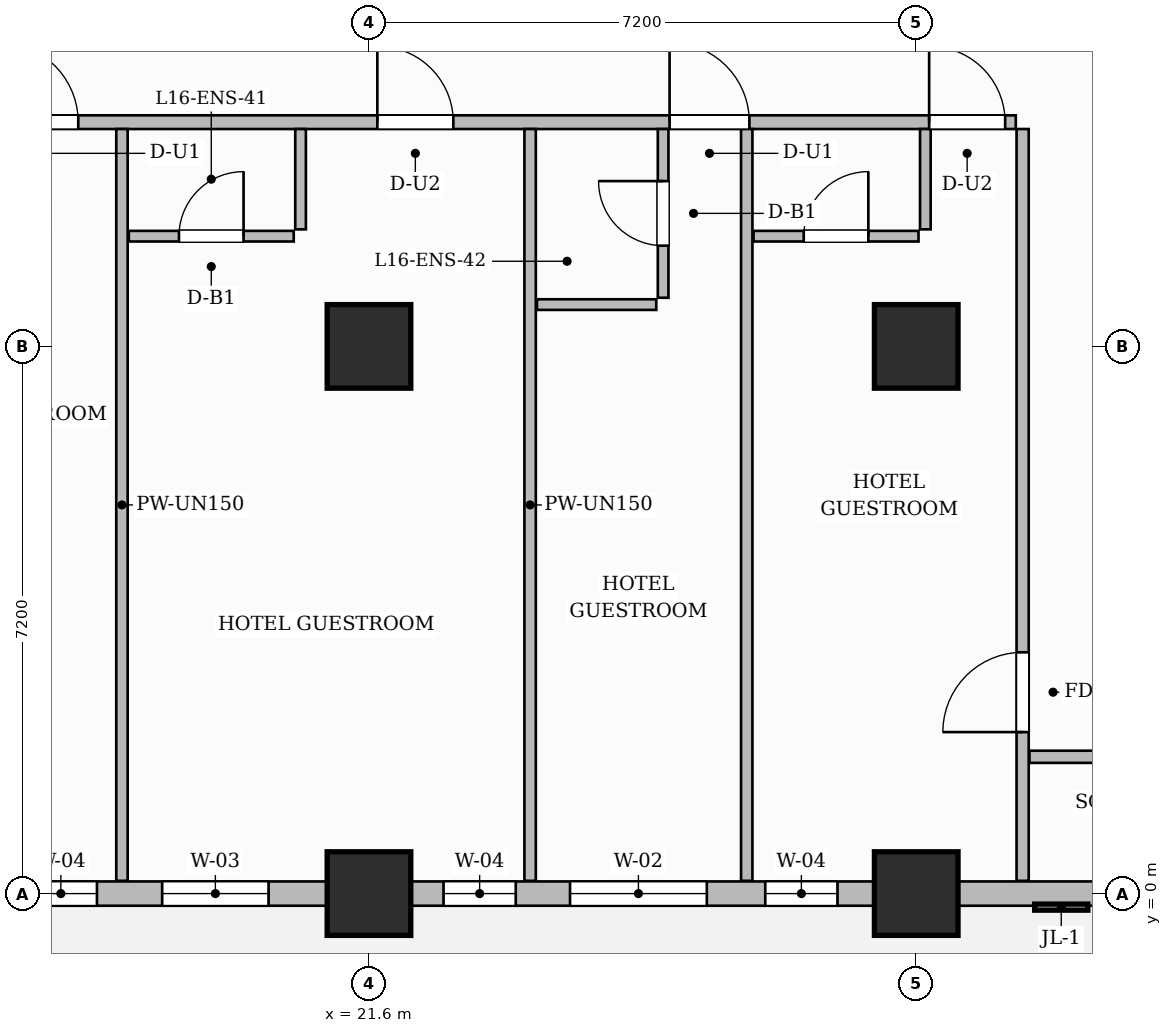
"""IFC4 building model, lengths in metres.
Left out: names, types, materials, properties, quantities, classifications, styles, units other than length and angle.
Written with IfcOpenShell. Run it as: python <this file> out.ifc"""

import sys

from ifc_helpers import new_model, si_unit, direction, frame, frame_2d, origin, origin_2d, place, context, subcontext, project, spatial, rectangle, extrude, source, transform, mapped, element, fill, save


model = new_model("IFC4")
c1 = context("Model", 3, precision=1e-05, world=origin(), true_north=direction((0.0, 1.0)))
c2 = subcontext(c1, "Body", "Model", "MODEL_VIEW")
j1 = project(units=[si_unit("LENGTHUNIT", "METRE"), si_unit("PLANEANGLEUNIT", "RADIAN")], contexts=[c1])
p1 = place(None, origin())
s1 = spatial("IfcSite", under=j1, at=p1, CompositionType="ELEMENT")
p2 = place(p1, origin())
s2 = spatial("IfcBuilding", under=s1, at=p2, CompositionType="ELEMENT")
p3 = place(p2, frame((0.0, 0.0, 69.4)))
s3 = spatial("IfcBuildingStorey", under=s2, at=p3, CompositionType="ELEMENT", Elevation=69.4)
m1 = source(origin(), c2, "Body", "SweptSolid", [
    extrude(rectangle(XDim=1.1, YDim=1.1, at=origin_2d()), origin(), (0.0, 0.0, 1.0), 3.7),
])
for number, where, z_axis, x_axis in (
    (1, (21.6, 0.0, 0.0), (0.0, 0.0, 1.0), (1.0, 0.0, 0.0)),
    (2, (21.6, 7.2, 0.0), (0.0, 0.0, 1.0), (1.0, 0.0, 0.0)),
    (3, (28.8, 0.0, 0.0), (0.0, 0.0, 1.0), (1.0, 0.0, 0.0)),
    (4, (28.8, 7.2, 0.0), (0.0, 0.0, 1.0), (1.0, 0.0, 0.0)),
):
    element("IfcColumn", number, at=place(p3, frame(where, z_axis=z_axis, x_axis=x_axis)), inside=s3, PredefinedType="COLUMN", context=c2, shape_type="MappedRepresentation", body=[
        mapped(m1, transform((0.0, 0.0, 0.0), scale=1.0)),
    ])
p4 = place(p3, frame((14.568, 10.15, 0.0), z_axis=(0.0, 0.0, 1.0), x_axis=(1.0, 0.0, 0.0)))
e5 = element("IfcWall", 5, at=p4, inside=s3, PredefinedType="PARTITIONING", context=c2, shape_type="SweptSolid", body=[
    extrude(rectangle(XDim=15.542, YDim=0.18, at=frame_2d((7.771, 0.0))), origin(), (0.0, 0.0, 1.0), 3.45),
])
p5 = place(p4, frame((2.157, 0.0, 0.0)))
e6 = element("IfcOpeningElement", 6, at=p5, cuts=e5, PredefinedType="OPENING", context=c2, shape_type="SweptSolid", body=[
    extrude(rectangle(XDim=1.05, YDim=2.25, at=frame_2d((0.525, 1.125))), frame((0.0, 0.1, 0.0), z_axis=(0.0, -1.0, 0.0), x_axis=(1.0, 0.0, 0.0)), (0.0, 0.0, 1.0), 0.2),
])
p6 = place(p4, frame((7.142, 0.0, 0.0)))
e7 = element("IfcOpeningElement", 7, at=p6, cuts=e5, PredefinedType="OPENING", context=c2, shape_type="SweptSolid", body=[
    extrude(rectangle(XDim=1.0, YDim=2.2, at=frame_2d((0.5, 1.1))), frame((0.0, 0.1, 0.0), z_axis=(0.0, -1.0, 0.0), x_axis=(1.0, 0.0, 0.0)), (0.0, 0.0, 1.0), 0.2),
])
p7 = place(p4, frame((10.987, 0.0, 0.0)))
e8 = element("IfcOpeningElement", 8, at=p7, cuts=e5, PredefinedType="OPENING", context=c2, shape_type="SweptSolid", body=[
    extrude(rectangle(XDim=1.05, YDim=2.25, at=frame_2d((0.525, 1.125))), frame((0.0, 0.1, 0.0), z_axis=(0.0, -1.0, 0.0), x_axis=(1.0, 0.0, 0.0)), (0.0, 0.0, 1.0), 0.2),
])
p8 = place(p4, frame((14.402, 0.0, 0.0)))
e9 = element("IfcOpeningElement", 9, at=p8, cuts=e5, PredefinedType="OPENING", context=c2, shape_type="SweptSolid", body=[
    extrude(rectangle(XDim=1.0, YDim=2.2, at=frame_2d((0.5, 1.1))), frame((0.0, 0.1, 0.0), z_axis=(0.0, -1.0, 0.0), x_axis=(1.0, 0.0, 0.0)), (0.0, 0.0, 1.0), 0.2),
])
p9 = place(p3, frame((30.2, 0.168, 0.0), z_axis=(0.0, 0.0, 1.0), x_axis=(0.0, 1.0, 0.0)))
e10 = element("IfcWall", 10, at=p9, inside=s3, PredefinedType="PARTITIONING", context=c2, shape_type="SweptSolid", body=[
    extrude(rectangle(XDim=9.892, YDim=0.16, at=frame_2d((4.946, 0.0))), origin(), (0.0, 0.0, 1.0), 3.45),
])
p10 = place(p9, frame((1.957, 0.0, 0.0)))
e11 = element("IfcOpeningElement", 11, at=p10, cuts=e10, PredefinedType="OPENING", context=c2, shape_type="SweptSolid", body=[
    extrude(rectangle(XDim=1.05, YDim=2.15, at=frame_2d((0.525, 1.075))), frame((0.0, 0.09, 0.0), z_axis=(0.0, -1.0, 0.0), x_axis=(1.0, 0.0, 0.0)), (0.0, 0.0, 1.0), 0.18),
])
p11 = place(p3, frame((30.29, 1.8, 0.0), z_axis=(0.0, 0.0, 1.0), x_axis=(1.0, 0.0, 0.0)))
e12 = element("IfcWall", 12, at=p11, inside=s3, PredefinedType="PARTITIONING", context=c2, shape_type="SweptSolid", body=[
    extrude(rectangle(XDim=19.37, YDim=0.16, at=frame_2d((9.685, 0.0))), origin(), (0.0, 0.0, 1.0), 3.45),
])
p12 = place(p11, frame((5.213, 0.0, 0.0)))
e13 = element("IfcOpeningElement", 13, at=p12, cuts=e12, PredefinedType="OPENING", context=c2, shape_type="SweptSolid", body=[
    extrude(rectangle(XDim=0.9, YDim=2.15, at=frame_2d((0.45, 1.075))), frame((0.0, 0.09, 0.0), z_axis=(0.0, -1.0, 0.0), x_axis=(1.0, 0.0, 0.0)), (0.0, 0.0, 1.0), 0.18),
])
p13 = place(p11, frame((14.06, 0.0, 0.0)))
e14 = element("IfcOpeningElement", 14, at=p13, cuts=e12, PredefinedType="OPENING", context=c2, shape_type="SweptSolid", body=[
    extrude(rectangle(XDim=0.9, YDim=2.15, at=frame_2d((0.45, 1.075))), frame((0.0, 0.09, 0.0), z_axis=(0.0, -1.0, 0.0), x_axis=(1.0, 0.0, 0.0)), (0.0, 0.0, 1.0), 0.18),
])
p14 = place(p3, frame((18.35, 0.168, 0.0), z_axis=(0.0, 0.0, 1.0), x_axis=(0.0, 1.0, 0.0)))
e15 = element("IfcWall", 15, at=p14, inside=s3, PredefinedType="PARTITIONING", context=c2, shape_type="SweptSolid", body=[
    extrude(rectangle(XDim=9.892, YDim=0.15, at=frame_2d((4.946, 0.0))), origin(), (0.0, 0.0, 1.0), 3.45),
])
p15 = place(p3, frame((20.7, 8.74, 0.0), z_axis=(0.0, 0.0, 1.0), x_axis=(0.0, 1.0, 0.0)))
e16 = element("IfcWall", 16, at=p15, inside=s3, PredefinedType="PARTITIONING", context=c2, shape_type="SweptSolid", body=[
    extrude(rectangle(XDim=1.32, YDim=0.14, at=frame_2d((0.66, 0.0))), origin(), (0.0, 0.0, 1.0), 3.45),
])
p16 = place(p3, frame((18.44, 8.65, 0.0), z_axis=(0.0, 0.0, 1.0), x_axis=(1.0, 0.0, 0.0)))
e17 = element("IfcWall", 17, at=p16, inside=s3, PredefinedType="PARTITIONING", context=c2, shape_type="SweptSolid", body=[
    extrude(rectangle(XDim=2.17, YDim=0.14, at=frame_2d((1.085, 0.0))), origin(), (0.0, 0.0, 1.0), 3.45),
])
p17 = place(p16, frame((0.66, 0.0, 0.0)))
e18 = element("IfcOpeningElement", 18, at=p17, cuts=e17, PredefinedType="OPENING", context=c2, shape_type="SweptSolid", body=[
    extrude(rectangle(XDim=0.85, YDim=2.1, at=frame_2d((0.425, 1.05))), frame((0.0, 0.08, 0.0), z_axis=(0.0, -1.0, 0.0), x_axis=(1.0, 0.0, 0.0)), (0.0, 0.0, 1.0), 0.16),
])
p18 = place(p3, frame((23.72, 0.168, 0.0), z_axis=(0.0, 0.0, 1.0), x_axis=(0.0, 1.0, 0.0)))
e19 = element("IfcWall", 19, at=p18, inside=s3, PredefinedType="PARTITIONING", context=c2, shape_type="SweptSolid", body=[
    extrude(rectangle(XDim=9.892, YDim=0.15, at=frame_2d((4.946, 0.0))), origin(), (0.0, 0.0, 1.0), 3.45),
])
p19 = place(p3, frame((25.47, 7.84, 0.0), z_axis=(0.0, 0.0, 1.0), x_axis=(0.0, 1.0, 0.0)))
e20 = element("IfcWall", 20, at=p19, inside=s3, PredefinedType="PARTITIONING", context=c2, shape_type="SweptSolid", body=[
    extrude(rectangle(XDim=2.22, YDim=0.14, at=frame_2d((1.11, 0.0))), origin(), (0.0, 0.0, 1.0), 3.45),
])
p20 = place(p19, frame((0.685, 0.0, 0.0)))
e21 = element("IfcOpeningElement", 21, at=p20, cuts=e20, PredefinedType="OPENING", context=c2, shape_type="SweptSolid", body=[
    extrude(rectangle(XDim=0.85, YDim=2.1, at=frame_2d((0.425, 1.05))), frame((0.0, 0.08, 0.0), z_axis=(0.0, -1.0, 0.0), x_axis=(1.0, 0.0, 0.0)), (0.0, 0.0, 1.0), 0.16),
])
p21 = place(p3, frame((23.81, 7.75, 0.0), z_axis=(0.0, 0.0, 1.0), x_axis=(1.0, 0.0, 0.0)))
e22 = element("IfcWall", 22, at=p21, inside=s3, PredefinedType="PARTITIONING", context=c2, shape_type="SweptSolid", body=[
    extrude(rectangle(XDim=1.57, YDim=0.14, at=frame_2d((0.785, 0.0))), origin(), (0.0, 0.0, 1.0), 3.45),
])
p22 = place(p3, frame((26.57, 0.168, 0.0), z_axis=(0.0, 0.0, 1.0), x_axis=(0.0, 1.0, 0.0)))
e23 = element("IfcWall", 23, at=p22, inside=s3, PredefinedType="PARTITIONING", context=c2, shape_type="SweptSolid", body=[
    extrude(rectangle(XDim=9.892, YDim=0.15, at=frame_2d((4.946, 0.0))), origin(), (0.0, 0.0, 1.0), 3.45),
])
p23 = place(p3, frame((28.92, 8.74, 0.0), z_axis=(0.0, 0.0, 1.0), x_axis=(0.0, 1.0, 0.0)))
e24 = element("IfcWall", 24, at=p23, inside=s3, PredefinedType="PARTITIONING", context=c2, shape_type="SweptSolid", body=[
    extrude(rectangle(XDim=1.32, YDim=0.14, at=frame_2d((0.66, 0.0))), origin(), (0.0, 0.0, 1.0), 2.885),
])
p24 = place(p3, frame((26.66, 8.65, 0.0), z_axis=(0.0, 0.0, 1.0), x_axis=(1.0, 0.0, 0.0)))
e25 = element("IfcWall", 25, at=p24, inside=s3, PredefinedType="PARTITIONING", context=c2, shape_type="SweptSolid", body=[
    extrude(rectangle(XDim=2.17, YDim=0.14, at=frame_2d((1.085, 0.0))), origin(), (0.0, 0.0, 1.0), 3.45),
])
p25 = place(p24, frame((0.66, 0.0, 0.0)))
e26 = element("IfcOpeningElement", 26, at=p25, cuts=e25, PredefinedType="OPENING", context=c2, shape_type="SweptSolid", body=[
    extrude(rectangle(XDim=0.85, YDim=2.1, at=frame_2d((0.425, 1.05))), frame((0.0, 0.08, 0.0), z_axis=(0.0, -1.0, 0.0), x_axis=(1.0, 0.0, 0.0)), (0.0, 0.0, 1.0), 0.16),
])
p26 = place(p3, frame((14.4, 0.0, 0.0), z_axis=(0.0, 0.0, 1.0), x_axis=(1.0, 0.0, 0.0)))
e27 = element("IfcWall", 27, at=p26, inside=s3, PredefinedType="SOLIDWALL", context=c2, shape_type="SweptSolid", body=[
    extrude(rectangle(XDim=43.2, YDim=0.32, at=frame_2d((21.6, 0.0))), origin(), (0.0, 0.0, 1.0), 2.885),
])
p27 = place(p26, frame((0.85, 0.0, 0.0)))
e28 = element("IfcOpeningElement", 28, at=p27, cuts=e27, PredefinedType="OPENING", context=c2, shape_type="SweptSolid", body=[
    extrude(rectangle(XDim=1.2, YDim=2.2, at=frame_2d((0.6, 1.1))), frame((0.0, 0.17, 0.0), z_axis=(0.0, -1.0, 0.0), x_axis=(1.0, 0.0, 0.0)), (0.0, 0.0, 1.0), 0.34),
])
p28 = place(p26, frame((2.671, 0.0, 0.8)))
e29 = element("IfcOpeningElement", 29, at=p28, cuts=e27, PredefinedType="OPENING", context=c2, shape_type="SweptSolid", body=[
    extrude(rectangle(XDim=0.95, YDim=1.75, at=frame_2d((0.475, 0.875))), frame((0.0, 0.17, 0.0), z_axis=(0.0, -1.0, 0.0), x_axis=(1.0, 0.0, 0.0)), (0.0, 0.0, 1.0), 0.34),
])
p29 = place(p26, frame((4.479, 0.0, 0.8)))
e30 = element("IfcOpeningElement", 30, at=p29, cuts=e27, PredefinedType="OPENING", context=c2, shape_type="SweptSolid", body=[
    extrude(rectangle(XDim=1.4, YDim=1.85, at=frame_2d((0.7, 0.925))), frame((0.0, 0.17, 0.0), z_axis=(0.0, -1.0, 0.0), x_axis=(1.0, 0.0, 0.0)), (0.0, 0.0, 1.0), 0.34),
])
p30 = place(p26, frame((8.181, 0.0, 0.8)))
e31 = element("IfcOpeningElement", 31, at=p30, cuts=e27, PredefinedType="OPENING", context=c2, shape_type="SweptSolid", body=[
    extrude(rectangle(XDim=0.95, YDim=1.75, at=frame_2d((0.475, 0.875))), frame((0.0, 0.17, 0.0), z_axis=(0.0, -1.0, 0.0), x_axis=(1.0, 0.0, 0.0)), (0.0, 0.0, 1.0), 0.34),
])
p31 = place(p26, frame((9.845, 0.0, 0.8)))
e32 = element("IfcOpeningElement", 32, at=p31, cuts=e27, PredefinedType="OPENING", context=c2, shape_type="SweptSolid", body=[
    extrude(rectangle(XDim=1.8, YDim=1.85, at=frame_2d((0.9, 0.925))), frame((0.0, 0.17, 0.0), z_axis=(0.0, -1.0, 0.0), x_axis=(1.0, 0.0, 0.0)), (0.0, 0.0, 1.0), 0.34),
])
p32 = place(p26, frame((12.414, 0.0, 0.8)))
e33 = element("IfcOpeningElement", 33, at=p32, cuts=e27, PredefinedType="OPENING", context=c2, shape_type="SweptSolid", body=[
    extrude(rectangle(XDim=0.95, YDim=1.75, at=frame_2d((0.475, 0.875))), frame((0.0, 0.17, 0.0), z_axis=(0.0, -1.0, 0.0), x_axis=(1.0, 0.0, 0.0)), (0.0, 0.0, 1.0), 0.34),
])
p33 = place(p26, frame((16.804, 0.0, 0.8)))
e34 = element("IfcOpeningElement", 34, at=p33, cuts=e27, PredefinedType="OPENING", context=c2, shape_type="SweptSolid", body=[
    extrude(rectangle(XDim=1.8, YDim=1.85, at=frame_2d((0.9, 0.925))), frame((0.0, 0.17, 0.0), z_axis=(0.0, -1.0, 0.0), x_axis=(1.0, 0.0, 0.0)), (0.0, 0.0, 1.0), 0.34),
])
p34 = place(p26, frame((22.396, 0.0, 0.8)))
e35 = element("IfcOpeningElement", 35, at=p34, cuts=e27, PredefinedType="OPENING", context=c2, shape_type="SweptSolid", body=[
    extrude(rectangle(XDim=1.8, YDim=1.85, at=frame_2d((0.9, 0.925))), frame((0.0, 0.17, 0.0), z_axis=(0.0, -1.0, 0.0), x_axis=(1.0, 0.0, 0.0)), (0.0, 0.0, 1.0), 0.34),
])
p35 = place(p26, frame((25.629, 0.0, 0.8)))
e36 = element("IfcOpeningElement", 36, at=p35, cuts=e27, PredefinedType="OPENING", context=c2, shape_type="SweptSolid", body=[
    extrude(rectangle(XDim=0.95, YDim=1.75, at=frame_2d((0.475, 0.875))), frame((0.0, 0.17, 0.0), z_axis=(0.0, -1.0, 0.0), x_axis=(1.0, 0.0, 0.0)), (0.0, 0.0, 1.0), 0.34),
])
p36 = place(p26, frame((29.075, 0.0, 0.8)))
e37 = element("IfcOpeningElement", 37, at=p36, cuts=e27, PredefinedType="OPENING", context=c2, shape_type="SweptSolid", body=[
    extrude(rectangle(XDim=1.8, YDim=1.85, at=frame_2d((0.9, 0.925))), frame((0.0, 0.17, 0.0), z_axis=(0.0, -1.0, 0.0), x_axis=(1.0, 0.0, 0.0)), (0.0, 0.0, 1.0), 0.34),
])
p37 = place(p26, frame((32.125, 0.0, 0.8)))
e38 = element("IfcOpeningElement", 38, at=p37, cuts=e27, PredefinedType="OPENING", context=c2, shape_type="SweptSolid", body=[
    extrude(rectangle(XDim=1.8, YDim=1.85, at=frame_2d((0.9, 0.925))), frame((0.0, 0.17, 0.0), z_axis=(0.0, -1.0, 0.0), x_axis=(1.0, 0.0, 0.0)), (0.0, 0.0, 1.0), 0.34),
])
p38 = place(p26, frame((36.946, 0.0, 0.8)))
e39 = element("IfcOpeningElement", 39, at=p38, cuts=e27, PredefinedType="OPENING", context=c2, shape_type="SweptSolid", body=[
    extrude(rectangle(XDim=1.8, YDim=1.85, at=frame_2d((0.9, 0.925))), frame((0.0, 0.17, 0.0), z_axis=(0.0, -1.0, 0.0), x_axis=(1.0, 0.0, 0.0)), (0.0, 0.0, 1.0), 0.34),
])
p39 = place(p26, frame((40.054, 0.0, 0.8)))
e40 = element("IfcOpeningElement", 40, at=p39, cuts=e27, PredefinedType="OPENING", context=c2, shape_type="SweptSolid", body=[
    extrude(rectangle(XDim=1.8, YDim=1.85, at=frame_2d((0.9, 0.925))), frame((0.0, 0.17, 0.0), z_axis=(0.0, -1.0, 0.0), x_axis=(1.0, 0.0, 0.0)), (0.0, 0.0, 1.0), 0.34),
])
m2 = source(origin(), c2, "Body", "SweptSolid", [
    extrude(rectangle(XDim=1.05, YDim=2.15, at=frame_2d((0.525, 1.075))), frame((0.0, 0.025, 0.0), z_axis=(0.0, -1.0, 0.0), x_axis=(1.0, 0.0, 0.0)), (0.0, 0.0, 1.0), 0.05),
])
p40 = place(p10, origin())
e41 = element("IfcDoor", 41, at=p40, inside=s3, OperationType="SINGLE_SWING_LEFT", PredefinedType="DOOR", context=c2, shape_type="MappedRepresentation", body=[
    mapped(m2, transform((0.0, 0.0, 0.0), scale=1.0)),
])
fill(e11, e41)
m3 = source(origin(), c2, "Body", "SweptSolid", [
    extrude(rectangle(XDim=1.05, YDim=2.25, at=frame_2d((0.525, 1.125))), frame((0.0, 0.025, 0.0), z_axis=(0.0, -1.0, 0.0), x_axis=(1.0, 0.0, 0.0)), (0.0, 0.0, 1.0), 0.05),
])
p41 = place(p5, origin())
e42 = element("IfcDoor", 42, at=p41, inside=s3, OperationType="SINGLE_SWING_LEFT", PredefinedType="DOOR", context=c2, shape_type="MappedRepresentation", body=[
    mapped(m3, transform((0.0, 0.0, 0.0), scale=1.0)),
])
fill(e6, e42)
m4 = source(origin(), c2, "Body", "SweptSolid", [
    extrude(rectangle(XDim=0.85, YDim=2.1, at=frame_2d((0.425, 1.05))), frame((0.0, 0.025, 0.0), z_axis=(0.0, -1.0, 0.0), x_axis=(1.0, 0.0, 0.0)), (0.0, 0.0, 1.0), 0.05),
])
p42 = place(p17, origin())
e43 = element("IfcDoor", 43, at=p42, inside=s3, OperationType="SINGLE_SWING_RIGHT", PredefinedType="DOOR", context=c2, shape_type="MappedRepresentation", body=[
    mapped(m4, transform((0.0, 0.0, 0.0), scale=1.0)),
])
fill(e18, e43)
m5 = source(origin(), c2, "Body", "SweptSolid", [
    extrude(rectangle(XDim=1.0, YDim=2.2, at=frame_2d((0.5, 1.1))), frame((0.0, 0.025, 0.0), z_axis=(0.0, -1.0, 0.0), x_axis=(1.0, 0.0, 0.0)), (0.0, 0.0, 1.0), 0.05),
])
p43 = place(p6, origin())
e44 = element("IfcDoor", 44, at=p43, inside=s3, OperationType="SINGLE_SWING_LEFT", PredefinedType="DOOR", context=c2, shape_type="MappedRepresentation", body=[
    mapped(m5, transform((0.0, 0.0, 0.0), scale=1.0)),
])
fill(e7, e44)
p44 = place(p20, origin())
e45 = element("IfcDoor", 45, at=p44, inside=s3, OperationType="SINGLE_SWING_RIGHT", PredefinedType="DOOR", context=c2, shape_type="MappedRepresentation", body=[
    mapped(m4, transform((0.0, 0.0, 0.0), scale=1.0)),
])
fill(e21, e45)
p45 = place(p7, origin())
e46 = element("IfcDoor", 46, at=p45, inside=s3, OperationType="SINGLE_SWING_LEFT", PredefinedType="DOOR", context=c2, shape_type="MappedRepresentation", body=[
    mapped(m3, transform((0.0, 0.0, 0.0), scale=1.0)),
])
fill(e8, e46)
p46 = place(p25, origin())
e47 = element("IfcDoor", 47, at=p46, inside=s3, OperationType="SINGLE_SWING_RIGHT", PredefinedType="DOOR", context=c2, shape_type="MappedRepresentation", body=[
    mapped(m4, transform((0.0, 0.0, 0.0), scale=1.0)),
])
fill(e26, e47)
p47 = place(p8, origin())
e48 = element("IfcDoor", 48, at=p47, inside=s3, OperationType="SINGLE_SWING_LEFT", PredefinedType="DOOR", context=c2, shape_type="MappedRepresentation", body=[
    mapped(m5, transform((0.0, 0.0, 0.0), scale=1.0)),
])
fill(e9, e48)
m6 = source(origin(), c2, "Body", "SweptSolid", [
    extrude(rectangle(XDim=0.95, YDim=1.75, at=frame_2d((0.475, 0.875))), frame((0.0, 0.03, 0.0), z_axis=(0.0, -1.0, 0.0), x_axis=(1.0, 0.0, 0.0)), (0.0, 0.0, 1.0), 0.06),
])
p48 = place(p28, origin())
e49 = element("IfcWindow", 49, at=p48, inside=s3, PartitioningType="SINGLE_PANEL", PredefinedType="WINDOW", context=c2, shape_type="MappedRepresentation", body=[
    mapped(m6, transform((0.0, 0.0, 0.0), scale=1.0)),
])
fill(e29, e49)
m7 = source(origin(), c2, "Body", "SweptSolid", [
    extrude(rectangle(XDim=1.4, YDim=1.85, at=frame_2d((0.7, 0.925))), frame((0.0, 0.03, 0.0), z_axis=(0.0, -1.0, 0.0), x_axis=(1.0, 0.0, 0.0)), (0.0, 0.0, 1.0), 0.06),
])
p49 = place(p29, origin())
e50 = element("IfcWindow", 50, at=p49, inside=s3, PartitioningType="SINGLE_PANEL", PredefinedType="WINDOW", context=c2, shape_type="MappedRepresentation", body=[
    mapped(m7, transform((0.0, 0.0, 0.0), scale=1.0)),
])
fill(e30, e50)
p50 = place(p30, origin())
e51 = element("IfcWindow", 51, at=p50, inside=s3, PartitioningType="SINGLE_PANEL", PredefinedType="WINDOW", context=c2, shape_type="MappedRepresentation", body=[
    mapped(m6, transform((0.0, 0.0, 0.0), scale=1.0)),
])
fill(e31, e51)
m8 = source(origin(), c2, "Body", "SweptSolid", [
    extrude(rectangle(XDim=1.8, YDim=1.85, at=frame_2d((0.9, 0.925))), frame((0.0, 0.03, 0.0), z_axis=(0.0, -1.0, 0.0), x_axis=(1.0, 0.0, 0.0)), (0.0, 0.0, 1.0), 0.06),
])
p51 = place(p31, origin())
e52 = element("IfcWindow", 52, at=p51, inside=s3, PartitioningType="DOUBLE_PANEL_VERTICAL", PredefinedType="WINDOW", context=c2, shape_type="MappedRepresentation", body=[
    mapped(m8, transform((0.0, 0.0, 0.0), scale=1.0)),
])
fill(e32, e52)
p52 = place(p32, origin())
e53 = element("IfcWindow", 53, at=p52, inside=s3, PartitioningType="SINGLE_PANEL", PredefinedType="WINDOW", context=c2, shape_type="MappedRepresentation", body=[
    mapped(m6, transform((0.0, 0.0, 0.0), scale=1.0)),
])
fill(e33, e53)
save(model, sys.argv[1])
